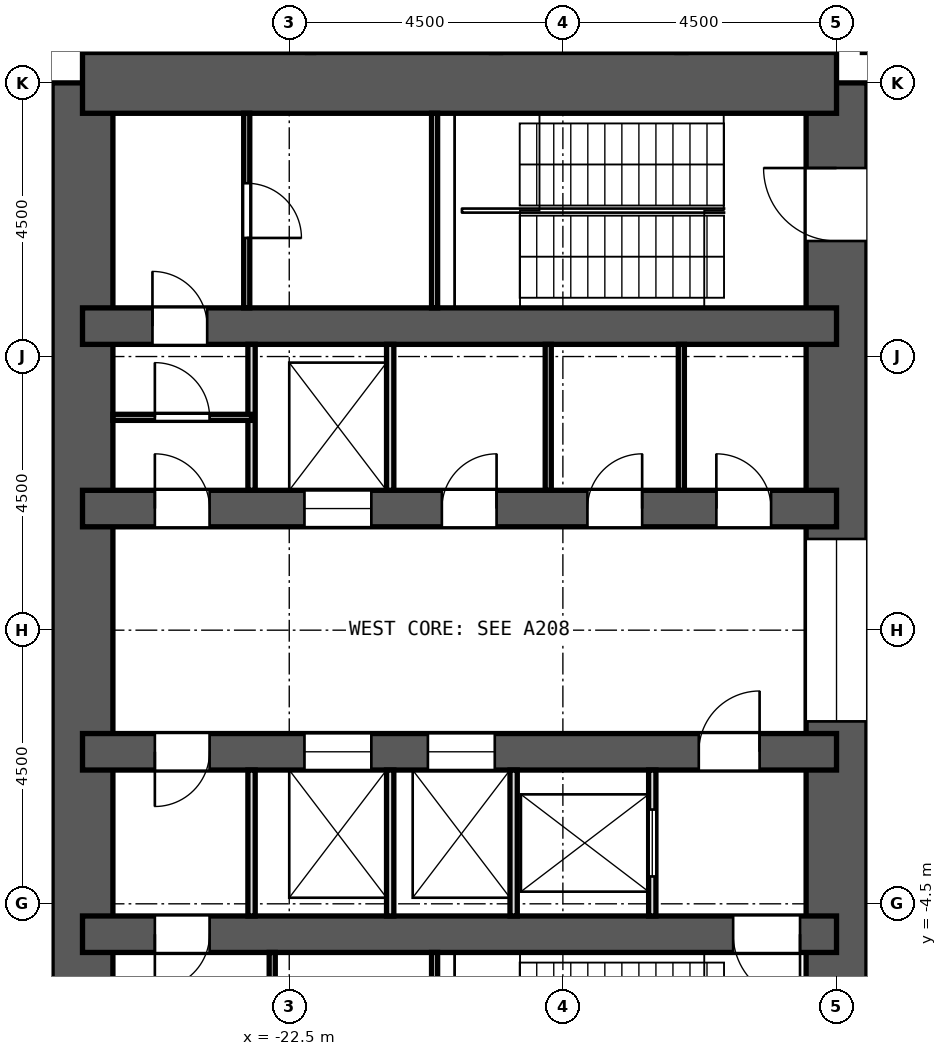
"""IFC4 building model, lengths in metres.
Left out: names, types, materials, properties, quantities, classifications, styles, units other than length and angle.
Written with IfcOpenShell. Run it as: python <this file> out.ifc"""

import sys

from ifc_helpers import new_model, si_unit, direction, frame, frame_2d, origin, place, context, subcontext, project, spatial, rectangle, extrude, element, fill, save


model = new_model("IFC4")
c1 = context("Model", 3, precision=1e-05, world=origin(), true_north=direction((0.0, 1.0)))
c2 = subcontext(c1, "Body", "Model", "MODEL_VIEW")
j1 = project(units=[si_unit("LENGTHUNIT", "METRE"), si_unit("PLANEANGLEUNIT", "RADIAN")], contexts=[c1])
p1 = place(None, origin())
s1 = spatial("IfcSite", under=j1, at=p1, CompositionType="ELEMENT")
p2 = place(p1, origin())
s2 = spatial("IfcBuilding", under=s1, at=p2, CompositionType="ELEMENT")
p3 = place(p2, frame((0.0, 0.0, 21.8)))
s3 = spatial("IfcBuildingStorey", under=s2, at=p3, CompositionType="ELEMENT", Elevation=21.8)
p4 = place(p3, frame((-13.5, -9.0, 0.0), z_axis=(0.0, 0.0, 1.0), x_axis=(0.0, 1.0, 0.0)))
e1 = element("IfcWall", 1, at=p4, inside=s3, PredefinedType="SHEAR", context=c2, shape_type="SweptSolid", body=[
    extrude(rectangle(XDim=18.0, YDim=1.0, at=frame_2d((9.0, 0.0))), origin(), (0.0, 0.0, 1.0), 4.5),
])
p5 = place(p4, frame((15.4, 0.0, 0.0)))
e2 = element("IfcOpeningElement", 2, at=p5, cuts=e1, PredefinedType="OPENING", context=c2, shape_type="SweptSolid", body=[
    extrude(rectangle(XDim=1.2, YDim=2.1, at=frame_2d((0.6, 1.05))), frame((0.0, 0.512, 0.0), z_axis=(0.0, -1.0, 0.0), x_axis=(1.0, 0.0, 0.0)), (0.0, 0.0, 1.0), 1.024),
])
p6 = place(p4, frame((1.4, 0.0, 0.0)))
e3 = element("IfcOpeningElement", 3, at=p6, cuts=e1, PredefinedType="OPENING", context=c2, shape_type="SweptSolid", body=[
    extrude(rectangle(XDim=1.2, YDim=2.1, at=frame_2d((0.6, 1.05))), frame((0.0, 0.512, 0.0), z_axis=(0.0, -1.0, 0.0), x_axis=(1.0, 0.0, 0.0)), (0.0, 0.0, 1.0), 1.024),
])
p7 = place(p4, frame((7.5, 0.0, 0.0)))
e4 = element("IfcOpeningElement", 4, at=p7, cuts=e1, PredefinedType="OPENING", context=c2, shape_type="SweptSolid", body=[
    extrude(rectangle(XDim=3.0, YDim=2.4, at=frame_2d((1.5, 1.2))), frame((0.0, 0.512, 0.0), z_axis=(0.0, -1.0, 0.0), x_axis=(1.0, 0.0, 0.0)), (0.0, 0.0, 1.0), 1.024),
])
p8 = place(p3, frame((-25.9, -9.0, 0.0), z_axis=(0.0, 0.0, 1.0), x_axis=(0.0, 1.0, 0.0)))
e5 = element("IfcWall", 5, at=p8, inside=s3, PredefinedType="SHEAR", context=c2, shape_type="SweptSolid", body=[
    extrude(rectangle(XDim=18.0, YDim=1.0, at=frame_2d((9.0, 0.0))), origin(), (0.0, 0.0, 1.0), 4.5),
])
p9 = place(p3, frame((-13.5, 9.0, 0.0), z_axis=(0.0, 0.0, 1.0), x_axis=(-1.0, 0.0, 0.0)))
e6 = element("IfcWall", 6, at=p9, inside=s3, PredefinedType="SHEAR", context=c2, shape_type="SweptSolid", body=[
    extrude(rectangle(XDim=12.4, YDim=1.0, at=frame_2d((6.2, 0.0))), origin(), (0.0, 0.0, 1.0), 4.5),
])
p10 = place(p3, frame((-13.5, 5.0, 0.0), z_axis=(0.0, 0.0, 1.0), x_axis=(-1.0, 0.0, 0.0)))
e7 = element("IfcWall", 7, at=p10, inside=s3, PredefinedType="SHEAR", context=c2, shape_type="SweptSolid", body=[
    extrude(rectangle(XDim=12.4, YDim=0.6, at=frame_2d((6.2, 0.0))), origin(), (0.0, 0.0, 1.0), 4.5),
])
p11 = place(p10, frame((10.35, 0.0, 0.0)))
e8 = element("IfcOpeningElement", 8, at=p11, cuts=e7, PredefinedType="OPENING", context=c2, shape_type="SweptSolid", body=[
    extrude(rectangle(XDim=0.9, YDim=2.1, at=frame_2d((0.45, 1.05))), frame((0.0, 0.312, 0.0), z_axis=(0.0, -1.0, 0.0), x_axis=(1.0, 0.0, 0.0)), (0.0, 0.0, 1.0), 0.624),
])
p12 = place(p3, frame((-13.5, -5.0, 0.0), z_axis=(0.0, 0.0, 1.0), x_axis=(-1.0, 0.0, 0.0)))
e9 = element("IfcWall", 9, at=p12, inside=s3, PredefinedType="SHEAR", context=c2, shape_type="SweptSolid", body=[
    extrude(rectangle(XDim=12.4, YDim=0.6, at=frame_2d((6.2, 0.0))), origin(), (0.0, 0.0, 1.0), 4.5),
])
p13 = place(p12, frame((10.31, 0.0, 0.0)))
e10 = element("IfcOpeningElement", 10, at=p13, cuts=e9, PredefinedType="OPENING", context=c2, shape_type="SweptSolid", body=[
    extrude(rectangle(XDim=0.9, YDim=2.1, at=frame_2d((0.45, 1.05))), frame((0.0, 0.312, 0.0), z_axis=(0.0, -1.0, 0.0), x_axis=(1.0, 0.0, 0.0)), (0.0, 0.0, 1.0), 0.624),
])
p14 = place(p12, frame((0.6, 0.0, 0.0)))
e11 = element("IfcOpeningElement", 11, at=p14, cuts=e9, PredefinedType="OPENING", context=c2, shape_type="SweptSolid", body=[
    extrude(rectangle(XDim=1.1, YDim=2.1, at=frame_2d((0.55, 1.05))), frame((0.0, 0.312, 0.0), z_axis=(0.0, -1.0, 0.0), x_axis=(1.0, 0.0, 0.0)), (0.0, 0.0, 1.0), 0.624),
])
p15 = place(p3, frame((-13.5, 2.0, 0.0), z_axis=(0.0, 0.0, 1.0), x_axis=(-1.0, 0.0, 0.0)))
e12 = element("IfcWall", 12, at=p15, inside=s3, PredefinedType="SHEAR", context=c2, shape_type="SweptSolid", body=[
    extrude(rectangle(XDim=12.4, YDim=0.6, at=frame_2d((6.2, 0.0))), origin(), (0.0, 0.0, 1.0), 4.5),
])
p16 = place(p15, frame((7.65, 0.0, 0.0)))
e13 = element("IfcOpeningElement", 13, at=p16, cuts=e12, PredefinedType="OPENING", context=c2, shape_type="SweptSolid", body=[
    extrude(rectangle(XDim=1.1, YDim=2.1, at=frame_2d((0.55, 1.05))), frame((0.0, 0.312, 0.0), z_axis=(0.0, -1.0, 0.0), x_axis=(1.0, 0.0, 0.0)), (0.0, 0.0, 1.0), 0.624),
])
p17 = place(p15, frame((1.076, 0.0, 0.0)))
e14 = element("IfcOpeningElement", 14, at=p17, cuts=e12, PredefinedType="OPENING", context=c2, shape_type="SweptSolid", body=[
    extrude(rectangle(XDim=0.9, YDim=2.1, at=frame_2d((0.45, 1.05))), frame((0.0, 0.312, 0.0), z_axis=(0.0, -1.0, 0.0), x_axis=(1.0, 0.0, 0.0)), (0.0, 0.0, 1.0), 0.624),
])
p18 = place(p15, frame((3.196, 0.0, 0.0)))
e15 = element("IfcOpeningElement", 15, at=p18, cuts=e12, PredefinedType="OPENING", context=c2, shape_type="SweptSolid", body=[
    extrude(rectangle(XDim=0.9, YDim=2.1, at=frame_2d((0.45, 1.05))), frame((0.0, 0.312, 0.0), z_axis=(0.0, -1.0, 0.0), x_axis=(1.0, 0.0, 0.0)), (0.0, 0.0, 1.0), 0.624),
])
p19 = place(p15, frame((5.59, 0.0, 0.0)))
e16 = element("IfcOpeningElement", 16, at=p19, cuts=e12, PredefinedType="OPENING", context=c2, shape_type="SweptSolid", body=[
    extrude(rectangle(XDim=0.9, YDim=2.1, at=frame_2d((0.45, 1.05))), frame((0.0, 0.312, 0.0), z_axis=(0.0, -1.0, 0.0), x_axis=(1.0, 0.0, 0.0)), (0.0, 0.0, 1.0), 0.624),
])
p20 = place(p15, frame((10.31, 0.0, 0.0)))
e17 = element("IfcOpeningElement", 17, at=p20, cuts=e12, PredefinedType="OPENING", context=c2, shape_type="SweptSolid", body=[
    extrude(rectangle(XDim=0.9, YDim=2.1, at=frame_2d((0.45, 1.05))), frame((0.0, 0.312, 0.0), z_axis=(0.0, -1.0, 0.0), x_axis=(1.0, 0.0, 0.0)), (0.0, 0.0, 1.0), 0.624),
])
p21 = place(p3, frame((-13.5, -2.0, 0.0), z_axis=(0.0, 0.0, 1.0), x_axis=(-1.0, 0.0, 0.0)))
e18 = element("IfcWall", 18, at=p21, inside=s3, PredefinedType="SHEAR", context=c2, shape_type="SweptSolid", body=[
    extrude(rectangle(XDim=12.4, YDim=0.6, at=frame_2d((6.2, 0.0))), origin(), (0.0, 0.0, 1.0), 4.5),
])
p22 = place(p21, frame((5.62, 0.0, 0.0)))
e19 = element("IfcOpeningElement", 19, at=p22, cuts=e18, PredefinedType="OPENING", context=c2, shape_type="SweptSolid", body=[
    extrude(rectangle(XDim=1.1, YDim=2.1, at=frame_2d((0.55, 1.05))), frame((0.0, 0.312, 0.0), z_axis=(0.0, -1.0, 0.0), x_axis=(1.0, 0.0, 0.0)), (0.0, 0.0, 1.0), 0.624),
])
p23 = place(p21, frame((7.65, 0.0, 0.0)))
e20 = element("IfcOpeningElement", 20, at=p23, cuts=e18, PredefinedType="OPENING", context=c2, shape_type="SweptSolid", body=[
    extrude(rectangle(XDim=1.1, YDim=2.1, at=frame_2d((0.55, 1.05))), frame((0.0, 0.312, 0.0), z_axis=(0.0, -1.0, 0.0), x_axis=(1.0, 0.0, 0.0)), (0.0, 0.0, 1.0), 0.624),
])
p24 = place(p21, frame((1.265, 0.0, 0.0)))
e21 = element("IfcOpeningElement", 21, at=p24, cuts=e18, PredefinedType="OPENING", context=c2, shape_type="SweptSolid", body=[
    extrude(rectangle(XDim=1.0, YDim=2.1, at=frame_2d((0.5, 1.05))), frame((0.0, 0.312, 0.0), z_axis=(0.0, -1.0, 0.0), x_axis=(1.0, 0.0, 0.0)), (0.0, 0.0, 1.0), 0.624),
])
p25 = place(p21, frame((10.31, 0.0, 0.0)))
e22 = element("IfcOpeningElement", 22, at=p25, cuts=e18, PredefinedType="OPENING", context=c2, shape_type="SweptSolid", body=[
    extrude(rectangle(XDim=0.9, YDim=2.1, at=frame_2d((0.45, 1.05))), frame((0.0, 0.312, 0.0), z_axis=(0.0, -1.0, 0.0), x_axis=(1.0, 0.0, 0.0)), (0.0, 0.0, 1.0), 0.624),
])
p26 = place(p3, frame((-26.328, 11.255, 0.0), z_axis=(0.0, 0.0, 1.0), x_axis=(-0.342034744565, -0.939687306241, 0.0)))
e23 = element("IfcWall", 23, at=p26, inside=s3, PredefinedType="SOLIDWALL", context=c2, shape_type="SweptSolid", body=[
    extrude(rectangle(XDim=4.099, YDim=0.6, at=frame_2d((2.05, 0.0))), origin(), (0.0, 0.0, 1.0), 2.15),
])
for number, where, z_axis, x_axis in (
    (24, (-13.0, 9.5, 0.0), (0.0, 0.0, 1.0), (0.0, 1.0, 0.0)),
    (25, (-16.05, 9.5, 0.0), (0.0, 0.0, 1.0), (0.0, 1.0, 0.0)),
    (26, (-19.1, 9.5, 0.0), (0.0, 0.0, 1.0), (0.0, 1.0, 0.0)),
):
    element("IfcWall", number, at=place(p3, frame(where, z_axis=z_axis, x_axis=x_axis)), inside=s3, PredefinedType="PARTITIONING", context=c2, shape_type="SweptSolid", body=[
        extrude(rectangle(XDim=3.425, YDim=0.15, at=frame_2d((1.712, 0.0))), origin(), (0.0, 0.0, 1.0), 3.95),
    ])
p27 = place(p3, frame((-22.15, 9.5, 0.0), z_axis=(0.0, 0.0, 1.0), x_axis=(0.0, 1.0, 0.0)))
e27 = element("IfcWall", 27, at=p27, inside=s3, PredefinedType="PARTITIONING", context=c2, shape_type="SweptSolid", body=[
    extrude(rectangle(XDim=3.425, YDim=0.1, at=frame_2d((1.712, 0.0))), origin(), (0.0, 0.0, 1.0), 3.95),
])
for number, where, z_axis, x_axis in (
    (28, (-16.052, 2.3, 0.0), (0.0, 0.0, 1.0), (0.0, 1.0, 0.0)),
    (29, (-18.241, 2.3, 0.0), (0.0, 0.0, 1.0), (0.0, 1.0, 0.0)),
):
    element("IfcWall", number, at=place(p3, frame(where, z_axis=z_axis, x_axis=x_axis)), inside=s3, PredefinedType="PARTITIONING", context=c2, shape_type="SweptSolid", body=[
        extrude(rectangle(XDim=2.4, YDim=0.1, at=frame_2d((1.2, 0.0))), origin(), (0.0, 0.0, 1.0), 3.95),
    ])
for number, where, z_axis, x_axis in (
    (30, (-20.84, 2.3, 0.0), (0.0, 0.0, 1.0), (0.0, 1.0, 0.0)),
    (31, (-23.12, 2.3, 0.0), (0.0, 0.0, 1.0), (0.0, 1.0, 0.0)),
):
    element("IfcWall", number, at=place(p3, frame(where, z_axis=z_axis, x_axis=x_axis)), inside=s3, PredefinedType="PARTITIONING", context=c2, shape_type="SweptSolid", body=[
        extrude(rectangle(XDim=2.4, YDim=0.12, at=frame_2d((1.2, 0.0))), origin(), (0.0, 0.0, 1.0), 3.95),
    ])
p28 = place(p3, frame((-16.53, -4.7, 0.0), z_axis=(0.0, 0.0, 1.0), x_axis=(0.0, 1.0, 0.0)))
e32 = element("IfcWall", 32, at=p28, inside=s3, PredefinedType="PARTITIONING", context=c2, shape_type="SweptSolid", body=[
    extrude(rectangle(XDim=2.4, YDim=0.12, at=frame_2d((1.2, 0.0))), origin(), (0.0, 0.0, 1.0), 3.95),
])
p29 = place(p28, frame((0.65, 0.0, 0.0)))
e33 = element("IfcOpeningElement", 33, at=p29, cuts=e32, PredefinedType="OPENING", context=c2, shape_type="SweptSolid", body=[
    extrude(rectangle(XDim=1.1, YDim=2.1, at=frame_2d((0.55, 1.05))), frame((0.0, 0.072, 0.0), z_axis=(0.0, -1.0, 0.0), x_axis=(1.0, 0.0, 0.0)), (0.0, 0.0, 1.0), 0.144),
])
for number, where, z_axis, x_axis in (
    (34, (-18.81, -4.7, 0.0), (0.0, 0.0, 1.0), (0.0, 1.0, 0.0)),
    (35, (-20.84, -4.7, 0.0), (0.0, 0.0, 1.0), (0.0, 1.0, 0.0)),
    (36, (-23.12, -4.7, 0.0), (0.0, 0.0, 1.0), (0.0, 1.0, 0.0)),
):
    element("IfcWall", number, at=place(p3, frame(where, z_axis=z_axis, x_axis=x_axis)), inside=s3, PredefinedType="PARTITIONING", context=c2, shape_type="SweptSolid", body=[
        extrude(rectangle(XDim=2.4, YDim=0.12, at=frame_2d((1.2, 0.0))), origin(), (0.0, 0.0, 1.0), 3.95),
    ])
p30 = place(p3, frame((-23.12, 3.5, 0.0), z_axis=(0.0, 0.0, 1.0), x_axis=(-1.0, 0.0, 0.0)))
e37 = element("IfcWall", 37, at=p30, inside=s3, PredefinedType="PARTITIONING", context=c2, shape_type="SweptSolid", body=[
    extrude(rectangle(XDim=2.28, YDim=0.1, at=frame_2d((1.14, 0.0))), origin(), (0.0, 0.0, 1.0), 3.95),
])
p31 = place(p30, frame((0.69, 0.0, 0.0)))
e38 = element("IfcOpeningElement", 38, at=p31, cuts=e37, PredefinedType="OPENING", context=c2, shape_type="SweptSolid", body=[
    extrude(rectangle(XDim=0.9, YDim=2.1, at=frame_2d((0.45, 1.05))), frame((0.0, 0.062, 0.0), z_axis=(0.0, -1.0, 0.0), x_axis=(1.0, 0.0, 0.0)), (0.0, 0.0, 1.0), 0.124),
])
p32 = place(p3, frame((-20.11, 5.3, 0.0), z_axis=(0.0, 0.0, 1.0), x_axis=(0.0, 1.0, 0.0)))
e39 = element("IfcWall", 39, at=p32, inside=s3, PredefinedType="PARTITIONING", context=c2, shape_type="SweptSolid", body=[
    extrude(rectangle(XDim=3.2, YDim=0.1, at=frame_2d((1.6, 0.0))), origin(), (0.0, 0.0, 1.0), 3.95),
])
p33 = place(p3, frame((-23.199, 5.3, 0.0), z_axis=(0.0, 0.0, 1.0), x_axis=(0.0, 1.0, 0.0)))
e40 = element("IfcWall", 40, at=p33, inside=s3, PredefinedType="PARTITIONING", context=c2, shape_type="SweptSolid", body=[
    extrude(rectangle(XDim=3.2, YDim=0.1, at=frame_2d((1.6, 0.0))), origin(), (0.0, 0.0, 1.0), 3.95),
])
p34 = place(p33, frame((1.15, 0.0, 0.0)))
e41 = element("IfcOpeningElement", 41, at=p34, cuts=e40, PredefinedType="OPENING", context=c2, shape_type="SweptSolid", body=[
    extrude(rectangle(XDim=0.9, YDim=2.1, at=frame_2d((0.45, 1.05))), frame((0.0, 0.062, 0.0), z_axis=(0.0, -1.0, 0.0), x_axis=(1.0, 0.0, 0.0)), (0.0, 0.0, 1.0), 0.124),
])
p35 = place(p3, frame((-20.11, -8.5, 0.0), z_axis=(0.0, 0.0, 1.0), x_axis=(0.0, 1.0, 0.0)))
e42 = element("IfcWall", 42, at=p35, inside=s3, PredefinedType="PARTITIONING", context=c2, shape_type="SweptSolid", body=[
    extrude(rectangle(XDim=3.2, YDim=0.1, at=frame_2d((1.6, 0.0))), origin(), (0.0, 0.0, 1.0), 3.95),
])
p36 = place(p3, frame((-22.78, -8.5, 0.0), z_axis=(0.0, 0.0, 1.0), x_axis=(0.0, 1.0, 0.0)))
e43 = element("IfcWall", 43, at=p36, inside=s3, PredefinedType="PARTITIONING", context=c2, shape_type="SweptSolid", body=[
    extrude(rectangle(XDim=3.2, YDim=0.1, at=frame_2d((1.6, 0.0))), origin(), (0.0, 0.0, 1.0), 3.95),
])
p37 = place(p36, frame((1.15, 0.0, 0.0)))
e44 = element("IfcOpeningElement", 44, at=p37, cuts=e43, PredefinedType="OPENING", context=c2, shape_type="SweptSolid", body=[
    extrude(rectangle(XDim=0.9, YDim=2.1, at=frame_2d((0.45, 1.05))), frame((0.0, 0.062, 0.0), z_axis=(0.0, -1.0, 0.0), x_axis=(1.0, 0.0, 0.0)), (0.0, 0.0, 1.0), 0.124),
])
p38 = place(p16, origin())
e45 = element("IfcDoor", 45, at=p38, inside=s3, OperationType="DOUBLE_DOOR_SLIDING", PredefinedType="DOOR", context=c2, shape_type="SweptSolid", body=[
    extrude(rectangle(XDim=1.1, YDim=2.1, at=frame_2d((0.55, 1.05))), frame((0.0, 0.025, 0.0), z_axis=(0.0, -1.0, 0.0), x_axis=(1.0, 0.0, 0.0)), (0.0, 0.0, 1.0), 0.05),
])
fill(e13, e45)
p39 = place(p29, origin())
e46 = element("IfcDoor", 46, at=p39, inside=s3, OperationType="DOUBLE_DOOR_SLIDING", PredefinedType="DOOR", context=c2, shape_type="SweptSolid", body=[
    extrude(rectangle(XDim=1.1, YDim=2.1, at=frame_2d((0.55, 1.05))), frame((0.0, 0.025, 0.0), z_axis=(0.0, -1.0, 0.0), x_axis=(1.0, 0.0, 0.0)), (0.0, 0.0, 1.0), 0.05),
])
fill(e33, e46)
p40 = place(p22, origin())
e47 = element("IfcDoor", 47, at=p40, inside=s3, OperationType="DOUBLE_DOOR_SLIDING", PredefinedType="DOOR", context=c2, shape_type="SweptSolid", body=[
    extrude(rectangle(XDim=1.1, YDim=2.1, at=frame_2d((0.55, 1.05))), frame((0.0, 0.025, 0.0), z_axis=(0.0, -1.0, 0.0), x_axis=(1.0, 0.0, 0.0)), (0.0, 0.0, 1.0), 0.05),
])
fill(e19, e47)
p41 = place(p23, origin())
e48 = element("IfcDoor", 48, at=p41, inside=s3, OperationType="DOUBLE_DOOR_SLIDING", PredefinedType="DOOR", context=c2, shape_type="SweptSolid", body=[
    extrude(rectangle(XDim=1.1, YDim=2.1, at=frame_2d((0.55, 1.05))), frame((0.0, 0.025, 0.0), z_axis=(0.0, -1.0, 0.0), x_axis=(1.0, 0.0, 0.0)), (0.0, 0.0, 1.0), 0.05),
])
fill(e20, e48)
p42 = place(p17, frame((0.9, 0.0, 0.0), z_axis=(0.0, 0.0, 1.0), x_axis=(-1.0, 0.0, 0.0)))
e49 = element("IfcDoor", 49, at=p42, inside=s3, OperationType="SINGLE_SWING_LEFT", PredefinedType="DOOR", context=c2, shape_type="SweptSolid", body=[
    extrude(rectangle(XDim=0.9, YDim=2.1, at=frame_2d((0.45, 1.05))), frame((0.0, 0.025, 0.0), z_axis=(0.0, -1.0, 0.0), x_axis=(1.0, 0.0, 0.0)), (0.0, 0.0, 1.0), 0.05),
])
fill(e14, e49)
p43 = place(p18, frame((0.9, 0.0, 0.0), z_axis=(0.0, 0.0, 1.0), x_axis=(-1.0, 0.0, 0.0)))
e50 = element("IfcDoor", 50, at=p43, inside=s3, OperationType="SINGLE_SWING_RIGHT", PredefinedType="DOOR", context=c2, shape_type="SweptSolid", body=[
    extrude(rectangle(XDim=0.9, YDim=2.1, at=frame_2d((0.45, 1.05))), frame((0.0, 0.025, 0.0), z_axis=(0.0, -1.0, 0.0), x_axis=(1.0, 0.0, 0.0)), (0.0, 0.0, 1.0), 0.05),
])
fill(e15, e50)
p44 = place(p19, frame((0.9, 0.0, 0.0), z_axis=(0.0, 0.0, 1.0), x_axis=(-1.0, 0.0, 0.0)))
e51 = element("IfcDoor", 51, at=p44, inside=s3, OperationType="SINGLE_SWING_RIGHT", PredefinedType="DOOR", context=c2, shape_type="SweptSolid", body=[
    extrude(rectangle(XDim=0.9, YDim=2.1, at=frame_2d((0.45, 1.05))), frame((0.0, 0.025, 0.0), z_axis=(0.0, -1.0, 0.0), x_axis=(1.0, 0.0, 0.0)), (0.0, 0.0, 1.0), 0.05),
])
fill(e16, e51)
p45 = place(p20, frame((0.9, 0.0, 0.0), z_axis=(0.0, 0.0, 1.0), x_axis=(-1.0, 0.0, 0.0)))
e52 = element("IfcDoor", 52, at=p45, inside=s3, OperationType="SINGLE_SWING_LEFT", PredefinedType="DOOR", context=c2, shape_type="SweptSolid", body=[
    extrude(rectangle(XDim=0.9, YDim=2.1, at=frame_2d((0.45, 1.05))), frame((0.0, 0.025, 0.0), z_axis=(0.0, -1.0, 0.0), x_axis=(1.0, 0.0, 0.0)), (0.0, 0.0, 1.0), 0.05),
])
fill(e17, e52)
p46 = place(p24, frame((1.0, 0.0, 0.0), z_axis=(0.0, 0.0, 1.0), x_axis=(-1.0, 0.0, 0.0)))
e53 = element("IfcDoor", 53, at=p46, inside=s3, OperationType="SINGLE_SWING_RIGHT", PredefinedType="DOOR", context=c2, shape_type="SweptSolid", body=[
    extrude(rectangle(XDim=1.0, YDim=2.1, at=frame_2d((0.5, 1.05))), frame((0.0, 0.025, 0.0), z_axis=(0.0, -1.0, 0.0), x_axis=(1.0, 0.0, 0.0)), (0.0, 0.0, 1.0), 0.05),
])
fill(e21, e53)
p47 = place(p25, origin())
e54 = element("IfcDoor", 54, at=p47, inside=s3, OperationType="SINGLE_SWING_RIGHT", PredefinedType="DOOR", context=c2, shape_type="SweptSolid", body=[
    extrude(rectangle(XDim=0.9, YDim=2.1, at=frame_2d((0.45, 1.05))), frame((0.0, 0.025, 0.0), z_axis=(0.0, -1.0, 0.0), x_axis=(1.0, 0.0, 0.0)), (0.0, 0.0, 1.0), 0.05),
])
fill(e22, e54)
p48 = place(p31, frame((0.9, 0.0, 0.0), z_axis=(0.0, 0.0, 1.0), x_axis=(-1.0, 0.0, 0.0)))
e55 = element("IfcDoor", 55, at=p48, inside=s3, OperationType="SINGLE_SWING_LEFT", PredefinedType="DOOR", context=c2, shape_type="SweptSolid", body=[
    extrude(rectangle(XDim=0.9, YDim=2.1, at=frame_2d((0.45, 1.05))), frame((0.0, 0.025, 0.0), z_axis=(0.0, -1.0, 0.0), x_axis=(1.0, 0.0, 0.0)), (0.0, 0.0, 1.0), 0.05),
])
fill(e38, e55)
p49 = place(p34, frame((0.9, 0.0, 0.0), z_axis=(0.0, 0.0, 1.0), x_axis=(-1.0, 0.0, 0.0)))
e56 = element("IfcDoor", 56, at=p49, inside=s3, OperationType="SINGLE_SWING_RIGHT", PredefinedType="DOOR", context=c2, shape_type="SweptSolid", body=[
    extrude(rectangle(XDim=0.9, YDim=2.1, at=frame_2d((0.45, 1.05))), frame((0.0, 0.025, 0.0), z_axis=(0.0, -1.0, 0.0), x_axis=(1.0, 0.0, 0.0)), (0.0, 0.0, 1.0), 0.05),
])
fill(e41, e56)
p50 = place(p11, frame((0.9, 0.0, 0.0), z_axis=(0.0, 0.0, 1.0), x_axis=(-1.0, 0.0, 0.0)))
e57 = element("IfcDoor", 57, at=p50, inside=s3, OperationType="SINGLE_SWING_LEFT", PredefinedType="DOOR", context=c2, shape_type="SweptSolid", body=[
    extrude(rectangle(XDim=0.9, YDim=2.1, at=frame_2d((0.45, 1.05))), frame((0.0, 0.025, 0.0), z_axis=(0.0, -1.0, 0.0), x_axis=(1.0, 0.0, 0.0)), (0.0, 0.0, 1.0), 0.05),
])
fill(e8, e57)
p51 = place(p13, origin())
e58 = element("IfcDoor", 58, at=p51, inside=s3, OperationType="SINGLE_SWING_RIGHT", PredefinedType="DOOR", context=c2, shape_type="SweptSolid", body=[
    extrude(rectangle(XDim=0.9, YDim=2.1, at=frame_2d((0.45, 1.05))), frame((0.0, 0.025, 0.0), z_axis=(0.0, -1.0, 0.0), x_axis=(1.0, 0.0, 0.0)), (0.0, 0.0, 1.0), 0.05),
])
fill(e10, e58)
p52 = place(p14, origin())
e59 = element("IfcDoor", 59, at=p52, inside=s3, OperationType="SINGLE_SWING_LEFT", PredefinedType="DOOR", context=c2, shape_type="SweptSolid", body=[
    extrude(rectangle(XDim=1.1, YDim=2.1, at=frame_2d((0.55, 1.05))), frame((0.0, 0.025, 0.0), z_axis=(0.0, -1.0, 0.0), x_axis=(1.0, 0.0, 0.0)), (0.0, 0.0, 1.0), 0.05),
])
fill(e11, e59)
p53 = place(p5, origin())
e60 = element("IfcDoor", 60, at=p53, inside=s3, OperationType="SINGLE_SWING_RIGHT", PredefinedType="DOOR", context=c2, shape_type="SweptSolid", body=[
    extrude(rectangle(XDim=1.2, YDim=2.1, at=frame_2d((0.6, 1.05))), frame((0.0, 0.025, 0.0), z_axis=(0.0, -1.0, 0.0), x_axis=(1.0, 0.0, 0.0)), (0.0, 0.0, 1.0), 0.05),
])
fill(e2, e60)
p54 = place(p7, origin())
e61 = element("IfcDoor", 61, at=p54, inside=s3, OperationType="DOUBLE_DOOR_SLIDING", PredefinedType="DOOR", context=c2, shape_type="SweptSolid", body=[
    extrude(rectangle(XDim=3.0, YDim=2.4, at=frame_2d((1.5, 1.2))), frame((0.0, 0.025, 0.0), z_axis=(0.0, -1.0, 0.0), x_axis=(1.0, 0.0, 0.0)), (0.0, 0.0, 1.0), 0.05),
])
fill(e4, e61)
save(model, sys.argv[1])
